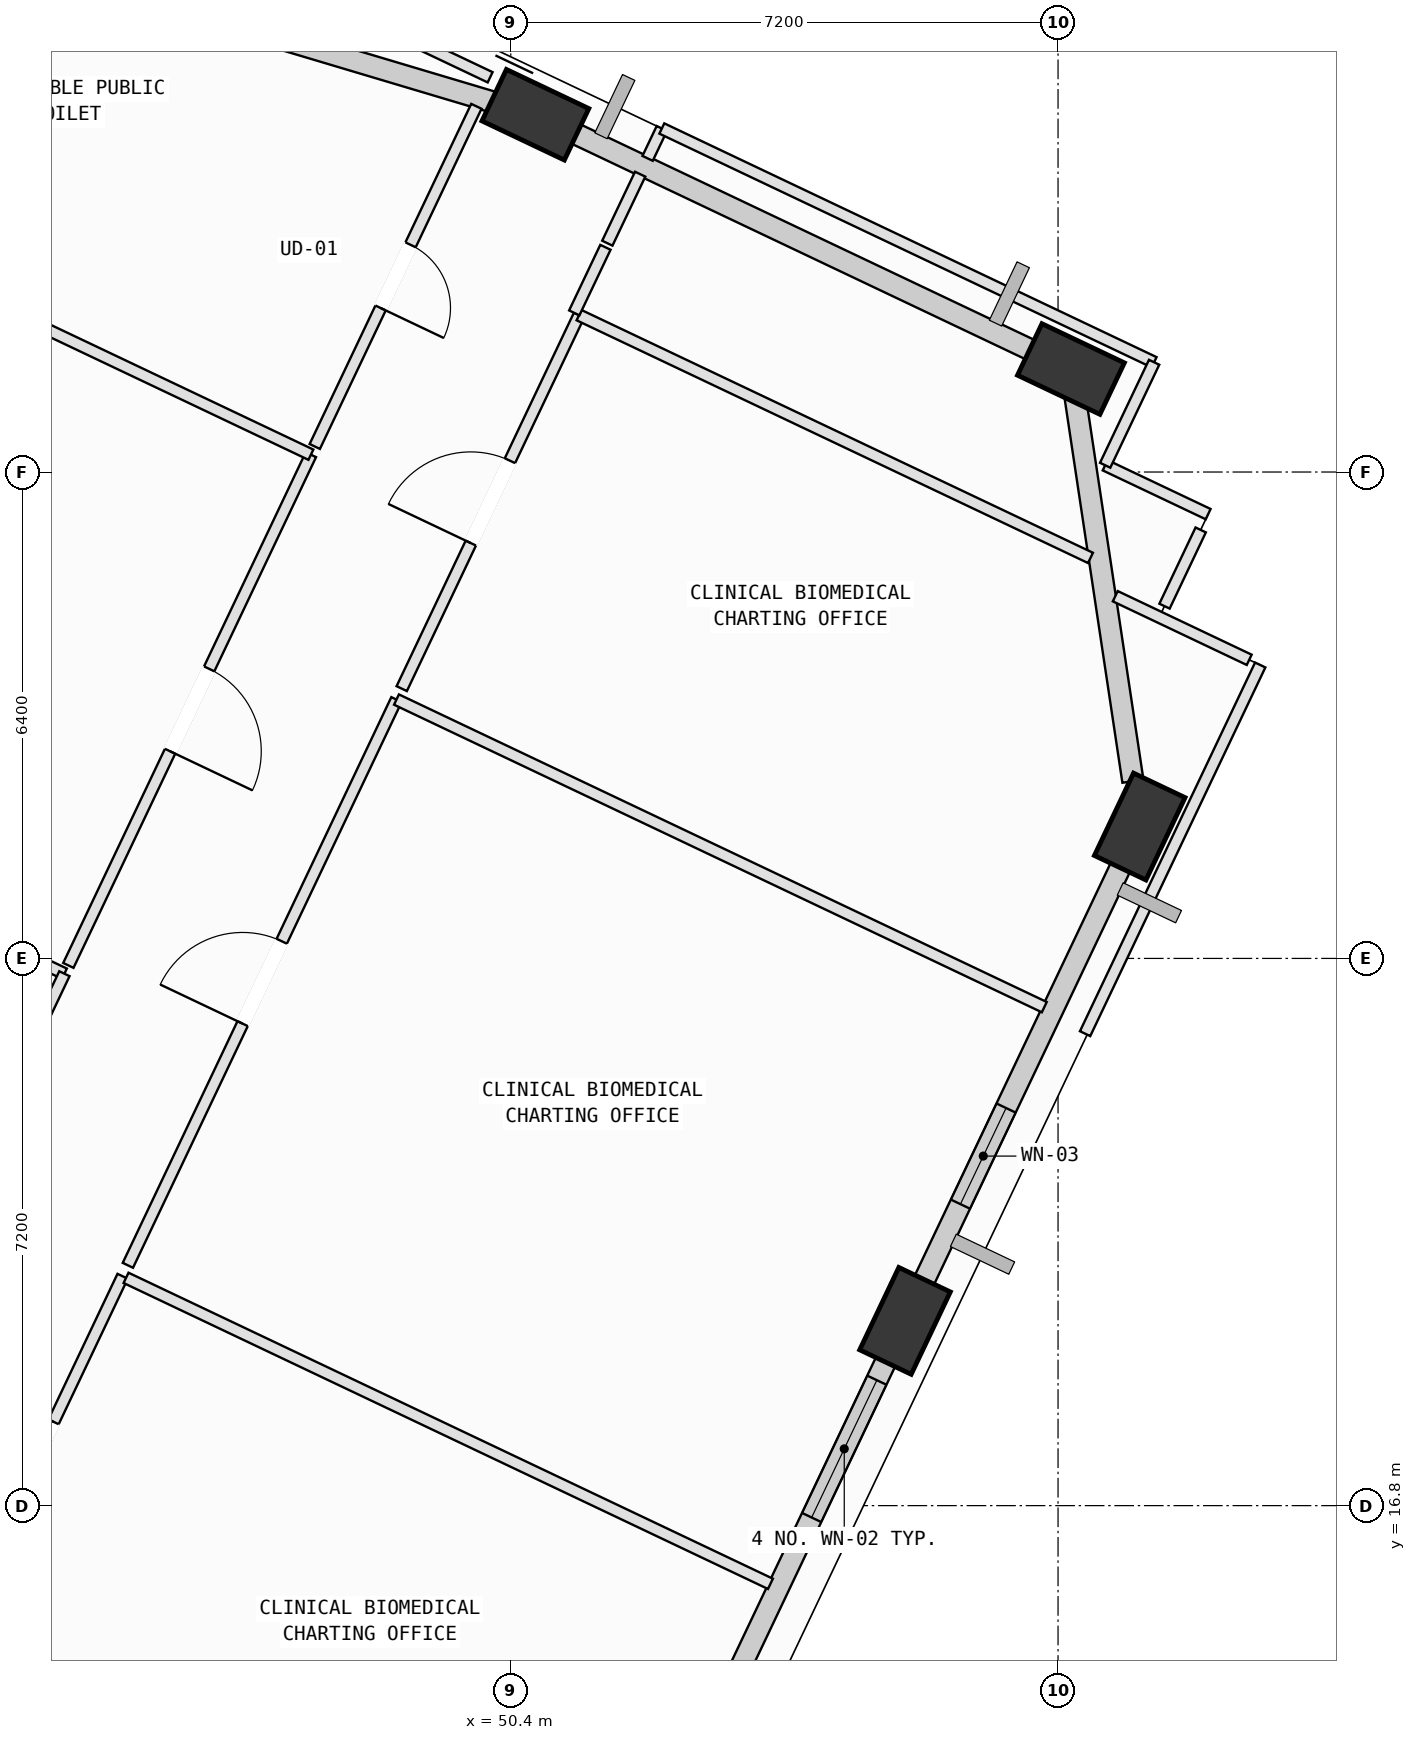
"""IFC4 building model, lengths in metres.
Left out: names, types, materials, properties, quantities, classifications, styles, units other than length and angle.
Written with IfcOpenShell. Run it as: python <this file> out.ifc"""

import sys

from ifc_helpers import new_model, si_unit, direction, frame, frame_2d, origin, origin_2d, place, context, subcontext, project, spatial, rectangle, extrude, element, fill, save


model = new_model("IFC4")
c1 = context("Model", 3, precision=1e-05, world=origin(), true_north=direction((0.0, 1.0)))
c2 = subcontext(c1, "Body", "Model", "MODEL_VIEW")
j1 = project(units=[si_unit("LENGTHUNIT", "METRE"), si_unit("PLANEANGLEUNIT", "RADIAN")], contexts=[c1])
p1 = place(None, origin())
s1 = spatial("IfcSite", under=j1, at=p1, CompositionType="ELEMENT")
p2 = place(p1, origin())
s2 = spatial("IfcBuilding", under=s1, at=p2, CompositionType="ELEMENT")
p3 = place(p2, frame((0.0, 0.0, 300.6)))
s3 = spatial("IfcBuildingStorey", under=s2, at=p3, CompositionType="ELEMENT", Elevation=300.6)
p4 = place(p3, frame((55.587, 19.231, 0.002), z_axis=(0.022200352556, 0.090930211153, 0.995609783523), x_axis=(-0.630008671759, -0.771971398071, 0.084553143461)))
e1 = element("IfcColumn", 1, at=p4, inside=s3, PredefinedType="COLUMN", context=c2, shape_type="SweptSolid", body=[
    extrude(rectangle(XDim=1.2, YDim=0.75, at=origin_2d()), origin(), (0.0, 0.0, 1.0), 4.014),
])
p5 = place(p3, frame((58.675, 25.735, 0.002), z_axis=(-0.004678768138, 0.103358241585, 0.994633190189), x_axis=(-0.387865677162, -0.916965064214, 0.093462759917)))
e2 = element("IfcColumn", 2, at=p5, inside=s3, PredefinedType="COLUMN", context=c2, shape_type="SweptSolid", body=[
    extrude(rectangle(XDim=1.2, YDim=0.75, at=origin_2d()), origin(), (0.0, 0.0, 1.0), 4.018),
])
p6 = place(p3, frame((57.77, 31.755, 0.002), z_axis=(-0.029469488843, 0.099406358241, 0.9946104389), x_axis=(0.987337085248, -0.152274829921, 0.04447309598)))
e3 = element("IfcColumn", 3, at=p6, inside=s3, PredefinedType="COLUMN", context=c2, shape_type="SweptSolid", body=[
    extrude(rectangle(XDim=1.2, YDim=0.75, at=origin_2d()), origin(), (0.0, 0.0, 1.0), 4.018),
])
p7 = place(p3, frame((50.724, 35.101, 0.002), z_axis=(-0.043165701388, 0.070380184492, 0.996585847709), x_axis=(0.993531986514, 0.10788896323, 0.03541416928)))
e4 = element("IfcColumn", 4, at=p7, inside=s3, PredefinedType="COLUMN", context=c2, shape_type="SweptSolid", body=[
    extrude(rectangle(XDim=1.2, YDim=0.75, at=origin_2d()), origin(), (0.0, 0.0, 1.0), 4.01),
])
p8 = place(p3, frame((55.496, 19.04, 0.0), z_axis=(0.0, 0.0, 1.0), x_axis=(-0.428921563444, -0.903341736229, 0.0)))
e5 = element("IfcWall", 5, at=p8, inside=s3, PredefinedType="SOLIDWALL", context=c2, shape_type="SweptSolid", body=[
    extrude(rectangle(XDim=6.407, YDim=0.28, at=frame_2d((3.204, 0.0))), origin(), (0.0, 0.0, 1.0), 3.265),
])
p9 = place(p8, frame((0.652, 0.0, 0.75)))
e6 = element("IfcOpeningElement", 6, at=p9, cuts=e5, PredefinedType="OPENING", context=c2, shape_type="SweptSolid", body=[
    extrude(rectangle(XDim=2.0, YDim=1.95, at=frame_2d((1.0, 0.975))), frame((0.0, 0.15, 0.0), z_axis=(0.0, -1.0, 0.0), x_axis=(1.0, 0.0, 0.0)), (0.0, 0.0, 1.0), 0.3),
])
p10 = place(p3, frame((58.588, 25.553, 0.0), z_axis=(0.0, 0.0, 1.0), x_axis=(-0.428939655653, -0.903333145527, 0.0)))
e7 = element("IfcWall", 7, at=p10, inside=s3, PredefinedType="SOLIDWALL", context=c2, shape_type="SweptSolid", body=[
    extrude(rectangle(XDim=6.418, YDim=0.28, at=frame_2d((3.209, 0.0))), origin(), (0.0, 0.0, 1.0), 3.265),
])
p11 = place(p10, frame((3.898, 0.0, 0.75)))
e8 = element("IfcOpeningElement", 8, at=p11, cuts=e7, PredefinedType="OPENING", context=c2, shape_type="SweptSolid", body=[
    extrude(rectangle(XDim=1.4, YDim=1.85, at=frame_2d((0.7, 0.925))), frame((0.0, 0.15, 0.0), z_axis=(0.0, -1.0, 0.0), x_axis=(1.0, 0.0, 0.0)), (0.0, 0.0, 1.0), 0.3),
])
p12 = place(p3, frame((57.798, 31.567, 0.0), z_axis=(0.0, 0.0, 1.0), x_axis=(0.148726062193, -0.988878434604, 0.0)))
e9 = element("IfcWall", 9, at=p12, inside=s3, PredefinedType="SOLIDWALL", context=c2, shape_type="SweptSolid", body=[
    extrude(rectangle(XDim=5.294, YDim=0.28, at=frame_2d((2.647, 0.0))), origin(), (0.0, 0.0, 1.0), 3.265),
])
p13 = place(p3, frame((50.948, 34.994, 0.0), z_axis=(0.0, 0.0, 1.0), x_axis=(0.903327518923, -0.428951504901, 0.0)))
e10 = element("IfcWall", 10, at=p13, inside=s3, PredefinedType="SOLIDWALL", context=c2, shape_type="SweptSolid", body=[
    extrude(rectangle(XDim=7.046, YDim=0.28, at=frame_2d((3.523, 0.0))), origin(), (0.0, 0.0, 1.0), 3.265),
])
p14 = place(p3, frame((41.58, 37.828, 0.0), z_axis=(0.0, 0.0, 1.0), x_axis=(0.958274258343, -0.285850390585, 0.0)))
e11 = element("IfcWall", 11, at=p14, inside=s3, PredefinedType="SOLIDWALL", context=c2, shape_type="SweptSolid", body=[
    extrude(rectangle(XDim=9.036, YDim=0.28, at=frame_2d((4.518, 0.0))), origin(), (0.0, 0.0, 1.0), 3.265),
])
p15 = place(p3, frame((42.891, 14.759, 0.0), z_axis=(0.0, 0.0, 1.0), x_axis=(0.903330146776, -0.428945970871, 0.0)))
e12 = element("IfcWall", 12, at=p15, inside=s3, PredefinedType="PARTITIONING", context=c2, shape_type="SweptSolid", body=[
    extrude(rectangle(XDim=9.435, YDim=0.15, at=frame_2d((4.718, 0.0))), origin(), (0.0, 0.0, 1.0), 3.78),
])
p16 = place(p3, frame((42.96, 14.904, 0.0), z_axis=(0.0, 0.0, 1.0), x_axis=(0.428881036616, 0.903360977921, 0.0)))
e13 = element("IfcWall", 13, at=p16, inside=s3, PredefinedType="PARTITIONING", context=c2, shape_type="SweptSolid", body=[
    extrude(rectangle(XDim=5.44, YDim=0.15, at=frame_2d((2.72, 0.0))), origin(), (0.0, 0.0, 1.0), 3.78),
])
p17 = place(p16, frame((2.12, 0.0, 0.0)))
e14 = element("IfcOpeningElement", 14, at=p17, cuts=e13, PredefinedType="OPENING", context=c2, shape_type="SweptSolid", body=[
    extrude(rectangle(XDim=1.2, YDim=2.15, at=frame_2d((0.6, 1.075))), frame((0.0, 0.085, 0.0), z_axis=(0.0, -1.0, 0.0), x_axis=(1.0, 0.0, 0.0)), (0.0, 0.0, 1.0), 0.17),
])
p18 = place(p3, frame((45.338, 19.797, 0.0), z_axis=(0.0, 0.0, 1.0), x_axis=(0.90331631407, -0.428975100367, 0.0)))
e15 = element("IfcWall", 15, at=p18, inside=s3, PredefinedType="PARTITIONING", context=c2, shape_type="SweptSolid", body=[
    extrude(rectangle(XDim=9.385, YDim=0.15, at=frame_2d((4.693, 0.0))), origin(), (0.0, 0.0, 1.0), 3.78),
])
p19 = place(p3, frame((45.362, 19.962, 0.0), z_axis=(0.0, 0.0, 1.0), x_axis=(0.428857978155, 0.903371924831, 0.0)))
e16 = element("IfcWall", 16, at=p19, inside=s3, PredefinedType="PARTITIONING", context=c2, shape_type="SweptSolid", body=[
    extrude(rectangle(XDim=8.24, YDim=0.15, at=frame_2d((4.12, 0.0))), origin(), (0.0, 0.0, 1.0), 3.415),
])
p20 = place(p19, frame((3.52, 0.0, 0.0)))
e17 = element("IfcOpeningElement", 17, at=p20, cuts=e16, PredefinedType="OPENING", context=c2, shape_type="SweptSolid", body=[
    extrude(rectangle(XDim=1.2, YDim=2.15, at=frame_2d((0.6, 1.075))), frame((0.0, 0.085, 0.0), z_axis=(0.0, -1.0, 0.0), x_axis=(1.0, 0.0, 0.0)), (0.0, 0.0, 1.0), 0.17),
])
p21 = place(p3, frame((48.896, 27.406, 0.0), z_axis=(0.0, 0.0, 1.0), x_axis=(0.903330146776, -0.428945970871, 0.0)))
e18 = element("IfcWall", 18, at=p21, inside=s3, PredefinedType="PARTITIONING", context=c2, shape_type="SweptSolid", body=[
    extrude(rectangle(XDim=9.435, YDim=0.15, at=frame_2d((4.718, 0.0))), origin(), (0.0, 0.0, 1.0), 3.78),
])
p22 = place(p3, frame((56.043, 19.656, 0.0), z_axis=(0.0, 0.0, 1.0), x_axis=(-0.428232225255, -0.903668723179, 0.0)))
e19 = element("IfcWall", 19, at=p22, inside=s3, PredefinedType="PARTITIONING", context=c2, shape_type="SweptSolid", body=[
    extrude(rectangle(XDim=0.791, YDim=0.15, at=frame_2d((0.396, 0.0))), origin(), (0.0, 0.0, 1.0), 3.265),
])
p23 = place(p3, frame((48.965, 27.55, 0.0), z_axis=(0.0, 0.0, 1.0), x_axis=(0.428881036616, 0.903360977921, 0.0)))
e20 = element("IfcWall", 20, at=p23, inside=s3, PredefinedType="PARTITIONING", context=c2, shape_type="SweptSolid", body=[
    extrude(rectangle(XDim=5.44, YDim=0.15, at=frame_2d((2.72, 0.0))), origin(), (0.0, 0.0, 1.0), 3.78),
])
p24 = place(p23, frame((2.12, 0.0, 0.0)))
e21 = element("IfcOpeningElement", 21, at=p24, cuts=e20, PredefinedType="OPENING", context=c2, shape_type="SweptSolid", body=[
    extrude(rectangle(XDim=1.2, YDim=2.15, at=frame_2d((0.6, 1.075))), frame((0.0, 0.085, 0.0), z_axis=(0.0, -1.0, 0.0), x_axis=(1.0, 0.0, 0.0)), (0.0, 0.0, 1.0), 0.17),
])
p25 = place(p3, frame((51.298, 32.464, 0.0), z_axis=(0.0, 0.0, 1.0), x_axis=(0.903391163135, -0.428817451103, 0.0)))
e22 = element("IfcWall", 22, at=p25, inside=s3, PredefinedType="PARTITIONING", context=c2, shape_type="SweptSolid", body=[
    extrude(rectangle(XDim=7.448, YDim=0.15, at=frame_2d((3.724, 0.0))), origin(), (0.0, 0.0, 1.0), 3.78),
])
p26 = place(p3, frame((58.353, 28.766, 0.0), z_axis=(0.0, 0.0, 1.0), x_axis=(0.903232633075, -0.429151267676, 0.0)))
e23 = element("IfcWall", 23, at=p26, inside=s3, PredefinedType="PARTITIONING", context=c2, shape_type="SweptSolid", body=[
    extrude(rectangle(XDim=1.951, YDim=0.15, at=frame_2d((0.975, 0.0))), origin(), (0.0, 0.0, 1.0), 3.78),
])
p27 = place(p3, frame((36.546, 27.589, 0.0), z_axis=(0.0, 0.0, 1.0), x_axis=(0.903322745046, -0.428961558047, 0.0)))
e24 = element("IfcWall", 24, at=p27, inside=s3, PredefinedType="PARTITIONING", context=c2, shape_type="SweptSolid", body=[
    extrude(rectangle(XDim=8.835, YDim=0.15, at=frame_2d((4.418, 0.0))), origin(), (0.0, 0.0, 1.0), 3.78),
])
p28 = place(p3, frame((44.527, 23.799, 0.0), z_axis=(0.0, 0.0, 1.0), x_axis=(-0.428918545399, -0.90334316924, 0.0)))
e25 = element("IfcWall", 25, at=p28, inside=s3, PredefinedType="PARTITIONING", context=c2, shape_type="SweptSolid", body=[
    extrude(rectangle(XDim=11.562, YDim=0.15, at=frame_2d((5.781, 0.0))), origin(), (0.0, 0.0, 1.0), 3.78),
])
p29 = place(p28, frame((5.181, 0.0, 0.0)))
e26 = element("IfcOpeningElement", 26, at=p29, cuts=e25, PredefinedType="OPENING", context=c2, shape_type="SweptSolid", body=[
    extrude(rectangle(XDim=1.2, YDim=2.15, at=frame_2d((0.6, 1.075))), frame((0.0, 0.085, 0.0), z_axis=(0.0, -1.0, 0.0), x_axis=(1.0, 0.0, 0.0)), (0.0, 0.0, 1.0), 0.17),
])
p30 = place(p3, frame((47.77, 30.628, 0.0), z_axis=(0.0, 0.0, 1.0), x_axis=(-0.428939661292, -0.90333314285, 0.0)))
e27 = element("IfcWall", 27, at=p30, inside=s3, PredefinedType="PARTITIONING", context=c2, shape_type="SweptSolid", body=[
    extrude(rectangle(XDim=7.439, YDim=0.15, at=frame_2d((3.719, 0.0))), origin(), (0.0, 0.0, 1.0), 3.78),
])
p31 = place(p30, frame((3.12, 0.0, 0.0)))
e28 = element("IfcOpeningElement", 28, at=p31, cuts=e27, PredefinedType="OPENING", context=c2, shape_type="SweptSolid", body=[
    extrude(rectangle(XDim=1.2, YDim=2.15, at=frame_2d((0.6, 1.075))), frame((0.0, 0.085, 0.0), z_axis=(0.0, -1.0, 0.0), x_axis=(1.0, 0.0, 0.0)), (0.0, 0.0, 1.0), 0.17),
])
p32 = place(p3, frame((39.789, 34.418, 0.0), z_axis=(0.0, 0.0, 1.0), x_axis=(0.903317660318, -0.428972265487, 0.0)))
e29 = element("IfcWall", 29, at=p32, inside=s3, PredefinedType="PARTITIONING", context=c2, shape_type="SweptSolid", body=[
    extrude(rectangle(XDim=8.835, YDim=0.15, at=frame_2d((4.417, 0.0))), origin(), (0.0, 0.0, 1.0), 3.78),
])
p33 = place(p3, frame((42.901, 39.026, 0.0), z_axis=(0.0, 0.0, 1.0), x_axis=(0.903324213929, -0.428958464807, 0.0)))
e30 = element("IfcWall", 30, at=p33, inside=s3, PredefinedType="PARTITIONING", context=c2, shape_type="SweptSolid", body=[
    extrude(rectangle(XDim=8.0, YDim=0.15, at=frame_2d((4.0, 0.0))), origin(), (0.0, 0.0, 1.0), 3.265),
])
p34 = place(p3, frame((49.947, 35.212, 0.0), z_axis=(0.0, 0.0, 1.0), x_axis=(-0.429049779465, -0.903280845995, 0.0)))
e31 = element("IfcWall", 31, at=p34, inside=s3, PredefinedType="PARTITIONING", context=c2, shape_type="SweptSolid", body=[
    extrude(rectangle(XDim=4.955, YDim=0.15, at=frame_2d((2.478, 0.0))), origin(), (0.0, 0.0, 1.0), 3.78),
])
p35 = place(p34, frame((2.018, 0.0, 0.0)))
e32 = element("IfcOpeningElement", 32, at=p35, cuts=e31, PredefinedType="OPENING", context=c2, shape_type="SweptSolid", body=[
    extrude(rectangle(XDim=0.92, YDim=2.1, at=frame_2d((0.46, 1.05))), frame((0.0, 0.085, 0.0), z_axis=(0.0, -1.0, 0.0), x_axis=(1.0, 0.0, 0.0)), (0.0, 0.0, 1.0), 0.17),
])
p36 = place(p3, frame((60.26, 27.861, 0.0), z_axis=(0.0, 0.0, 1.0), x_axis=(-0.429010449424, -0.903299526339, 0.0)))
e33 = element("IfcWall", 33, at=p36, inside=s3, PredefinedType="PARTITIONING", context=c2, shape_type="SweptSolid", body=[
    extrude(rectangle(XDim=5.37, YDim=0.15, at=frame_2d((2.685, 0.0))), origin(), (0.0, 0.0, 1.0), 3.78),
])
p37 = place(p3, frame((51.235, 32.494, 0.0), z_axis=(0.0, 0.0, 1.0), x_axis=(0.429030753446, 0.903289882926, 0.0)))
e34 = element("IfcWall", 34, at=p37, inside=s3, PredefinedType="PARTITIONING", context=c2, shape_type="SweptSolid", body=[
    extrude(rectangle(XDim=0.955, YDim=0.15, at=frame_2d((0.478, 0.0))), origin(), (0.0, 0.0, 1.0), 3.78),
])
p38 = place(p3, frame((59.477, 29.638, 0.0), z_axis=(0.0, 0.0, 1.0), x_axis=(-0.428823545912, -0.903388270054, 0.0)))
e35 = element("IfcWall", 35, at=p38, inside=s3, PredefinedType="PARTITIONING", context=c2, shape_type="SweptSolid", body=[
    extrude(rectangle(XDim=1.11, YDim=0.15, at=frame_2d((0.555, 0.0))), origin(), (0.0, 0.0, 1.0), 3.78),
])
p39 = place(p3, frame((58.22, 30.489, 0.0), z_axis=(0.0, 0.0, 1.0), x_axis=(0.90341939824, -0.428757963056, 0.0)))
e36 = element("IfcWall", 36, at=p39, inside=s3, PredefinedType="PARTITIONING", context=c2, shape_type="SweptSolid", body=[
    extrude(rectangle(XDim=1.5, YDim=0.15, at=frame_2d((0.75, 0.0))), origin(), (0.0, 0.0, 1.0), 3.78),
])
p40 = place(p3, frame((51.67, 33.411, 0.0), z_axis=(0.0, 0.0, 1.0), x_axis=(0.429650885409, 0.902995081198, 0.0)))
e37 = element("IfcWall", 37, at=p40, inside=s3, PredefinedType="PARTITIONING", context=c2, shape_type="SweptSolid", body=[
    extrude(rectangle(XDim=1.006, YDim=0.15, at=frame_2d((0.503, 0.0))), origin(), (0.0, 0.0, 1.0), 3.78),
])
p41 = place(p3, frame((52.2, 34.527, 0.0), z_axis=(0.0, 0.0, 1.0), x_axis=(0.429846448615, 0.902902004989, 0.0)))
e38 = element("IfcWall", 38, at=p41, inside=s3, PredefinedType="PARTITIONING", context=c2, shape_type="SweptSolid", body=[
    extrude(rectangle(XDim=0.435, YDim=0.15, at=frame_2d((0.218, 0.0))), origin(), (0.0, 0.0, 1.0), 3.78),
])
p42 = place(p3, frame((52.387, 34.92, 0.0), z_axis=(0.0, 0.0, 1.0), x_axis=(0.903313789713, -0.428980416004, 0.0)))
e39 = element("IfcWall", 39, at=p42, inside=s3, PredefinedType="PARTITIONING", context=c2, shape_type="SweptSolid", body=[
    extrude(rectangle(XDim=7.17, YDim=0.15, at=frame_2d((3.585, 0.0))), origin(), (0.0, 0.0, 1.0), 3.265),
])
p43 = place(p3, frame((58.864, 31.844, 0.0), z_axis=(0.0, 0.0, 1.0), x_axis=(-0.429289157269, -0.903167104943, 0.0)))
e40 = element("IfcWall", 40, at=p43, inside=s3, PredefinedType="PARTITIONING", context=c2, shape_type="SweptSolid", body=[
    extrude(rectangle(XDim=1.5, YDim=0.15, at=frame_2d((0.75, 0.0))), origin(), (0.0, 0.0, 1.0), 3.78),
])
p44 = place(p9, origin())
e41 = element("IfcWindow", 41, at=p44, inside=s3, PartitioningType="SINGLE_PANEL", PredefinedType="WINDOW", context=c2, shape_type="SweptSolid", body=[
    extrude(rectangle(XDim=2.0, YDim=1.95, at=frame_2d((1.0, 0.975))), frame((0.0, 0.03, 0.0), z_axis=(0.0, -1.0, 0.0), x_axis=(1.0, 0.0, 0.0)), (0.0, 0.0, 1.0), 0.06),
])
fill(e6, e41)
p45 = place(p11, origin())
e42 = element("IfcWindow", 42, at=p45, inside=s3, PartitioningType="SINGLE_PANEL", PredefinedType="WINDOW", context=c2, shape_type="SweptSolid", body=[
    extrude(rectangle(XDim=1.4, YDim=1.85, at=frame_2d((0.7, 0.925))), frame((0.0, 0.03, 0.0), z_axis=(0.0, -1.0, 0.0), x_axis=(1.0, 0.0, 0.0)), (0.0, 0.0, 1.0), 0.06),
])
fill(e8, e42)
p46 = place(p17, origin())
e43 = element("IfcDoor", 43, at=p46, inside=s3, OperationType="SINGLE_SWING_RIGHT", PredefinedType="DOOR", context=c2, shape_type="SweptSolid", body=[
    extrude(rectangle(XDim=1.2, YDim=2.15, at=frame_2d((0.6, 1.075))), frame((0.0, 0.025, 0.0), z_axis=(0.0, -1.0, 0.0), x_axis=(1.0, 0.0, 0.0)), (0.0, 0.0, 1.0), 0.05),
])
fill(e14, e43)
p47 = place(p20, origin())
e44 = element("IfcDoor", 44, at=p47, inside=s3, OperationType="SINGLE_SWING_LEFT", PredefinedType="DOOR", context=c2, shape_type="SweptSolid", body=[
    extrude(rectangle(XDim=1.2, YDim=2.15, at=frame_2d((0.6, 1.075))), frame((0.0, 0.025, 0.0), z_axis=(0.0, -1.0, 0.0), x_axis=(1.0, 0.0, 0.0)), (0.0, 0.0, 1.0), 0.05),
])
fill(e17, e44)
p48 = place(p24, origin())
e45 = element("IfcDoor", 45, at=p48, inside=s3, OperationType="SINGLE_SWING_LEFT", PredefinedType="DOOR", context=c2, shape_type="SweptSolid", body=[
    extrude(rectangle(XDim=1.2, YDim=2.15, at=frame_2d((0.6, 1.075))), frame((0.0, 0.025, 0.0), z_axis=(0.0, -1.0, 0.0), x_axis=(1.0, 0.0, 0.0)), (0.0, 0.0, 1.0), 0.05),
])
fill(e21, e45)
p49 = place(p31, origin())
e46 = element("IfcDoor", 46, at=p49, inside=s3, OperationType="SINGLE_SWING_RIGHT", PredefinedType="DOOR", context=c2, shape_type="SweptSolid", body=[
    extrude(rectangle(XDim=1.2, YDim=2.15, at=frame_2d((0.6, 1.075))), frame((0.0, 0.025, 0.0), z_axis=(0.0, -1.0, 0.0), x_axis=(1.0, 0.0, 0.0)), (0.0, 0.0, 1.0), 0.05),
])
fill(e28, e46)
p50 = place(p35, origin())
e47 = element("IfcDoor", 47, at=p50, inside=s3, OperationType="SINGLE_SWING_RIGHT", PredefinedType="DOOR", context=c2, shape_type="SweptSolid", body=[
    extrude(rectangle(XDim=0.92, YDim=2.1, at=frame_2d((0.46, 1.05))), frame((0.0, 0.025, 0.0), z_axis=(0.0, -1.0, 0.0), x_axis=(1.0, 0.0, 0.0)), (0.0, 0.0, 1.0), 0.05),
])
fill(e32, e47)
save(model, sys.argv[1])
